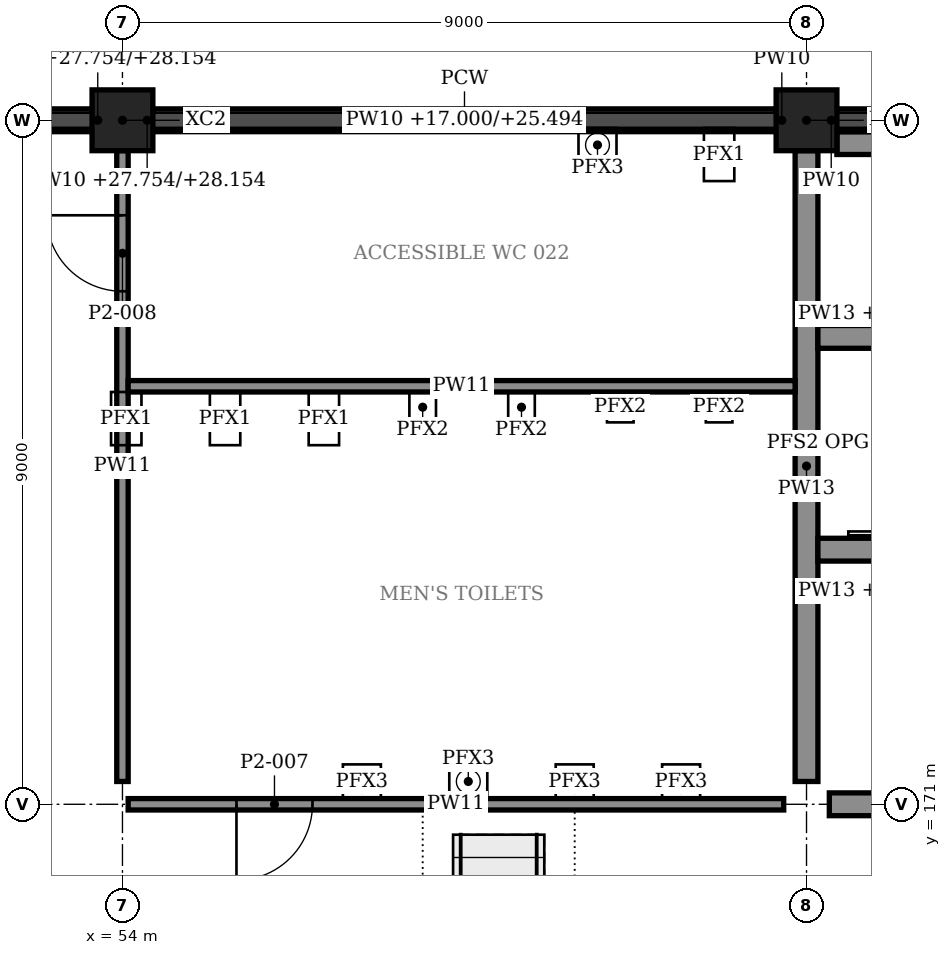
"""IFC4 building model, lengths in metres.
Left out: names, types, materials, properties, quantities, classifications, styles, units other than length and angle.
Written with IfcOpenShell. Run it as: python <this file> out.ifc"""

import sys

from ifc_helpers import new_model, si_unit, direction, frame, frame_2d, origin, origin_2d, place, context, subcontext, project, spatial, polyline, rectangle, outline, extrude, element, fill, save


model = new_model("IFC4")
c1 = context("Model", 3, precision=1e-05, world=origin(), true_north=direction((0.0, 1.0)))
c2 = subcontext(c1, "Body", "Model", "MODEL_VIEW")
j1 = project(units=[si_unit("LENGTHUNIT", "METRE"), si_unit("PLANEANGLEUNIT", "RADIAN")], contexts=[c1])
p1 = place(None, origin())
s1 = spatial("IfcSite", under=j1, at=p1, CompositionType="ELEMENT")
p2 = place(p1, origin())
s2 = spatial("IfcBuilding", under=s1, at=p2, CompositionType="ELEMENT")
p3 = place(p2, frame((0.0, 0.0, 11.5)))
s3 = spatial("IfcBuildingStorey", under=s2, at=p3, CompositionType="ELEMENT", Elevation=11.5)
for number, where, z_axis, x_axis in (
    (1, (54.0, 180.0, 0.0), (0.0, 0.0, 1.0), (1.0, 0.0, 0.0)),
    (2, (63.0, 180.0, 0.0), (0.0, 0.0, 1.0), (1.0, 0.0, 0.0)),
):
    element("IfcColumn", number, at=place(p3, frame(where, z_axis=z_axis, x_axis=x_axis)), inside=s3, PredefinedType="COLUMN", context=c2, shape_type="SweptSolid", body=[
        extrude(rectangle(XDim=0.8, YDim=0.8, at=origin_2d()), origin(), (0.0, 0.0, 1.0), 5.5),
    ])
p4 = place(p3, frame((45.4, 180.0, 5.5), z_axis=(0.0, 0.0, 1.0), x_axis=(1.0, 0.0, 0.0)))
e3 = element("IfcWall", 3, at=p4, inside=s3, PredefinedType="STANDARD", context=c2, shape_type="SweptSolid", body=[
    extrude(outline(polyline([(0.0, 0.0), (8.2, 0.0), (8.2, 10.767), (0.0, 11.846), (0.0, 0.0)])), frame((0.0, 0.15, 0.0), z_axis=(0.0, -1.0, 0.0), x_axis=(1.0, 0.0, 0.0)), (0.0, 0.0, 1.0), 0.3),
])
p5 = place(p3, frame((53.6, 180.0, 16.254), z_axis=(0.0, 0.0, 1.0), x_axis=(1.0, 0.0, 0.0)))
e4 = element("IfcWall", 4, at=p5, inside=s3, PredefinedType="STANDARD", context=c2, shape_type="SweptSolid", body=[
    extrude(rectangle(XDim=0.15, YDim=0.3, at=frame_2d((0.075, 0.0))), origin(), (0.0, 0.0, 1.0), 0.4),
])
p6 = place(p3, frame((54.4, 180.0, 5.5), z_axis=(0.0, 0.0, 1.0), x_axis=(1.0, 0.0, 0.0)))
e5 = element("IfcWall", 5, at=p6, inside=s3, PredefinedType="STANDARD", context=c2, shape_type="SweptSolid", body=[
    extrude(outline(polyline([(0.0, 0.0), (8.2, 0.0), (8.2, 8.494), (0.0, 10.653), (0.0, 0.0)])), frame((0.0, 0.15, 0.0), z_axis=(0.0, -1.0, 0.0), x_axis=(1.0, 0.0, 0.0)), (0.0, 0.0, 1.0), 0.3),
])
p7 = place(p3, frame((54.25, 180.0, 16.254), z_axis=(0.0, 0.0, 1.0), x_axis=(1.0, 0.0, 0.0)))
e6 = element("IfcWall", 6, at=p7, inside=s3, PredefinedType="STANDARD", context=c2, shape_type="SweptSolid", body=[
    extrude(rectangle(XDim=0.15, YDim=0.3, at=frame_2d((0.075, 0.0))), origin(), (0.0, 0.0, 1.0), 0.4),
])
p8 = place(p3, frame((62.6, 180.0, 13.969), z_axis=(0.0, 0.0, 1.0), x_axis=(1.0, 0.0, 0.0)))
e7 = element("IfcWall", 7, at=p8, inside=s3, PredefinedType="STANDARD", context=c2, shape_type="SweptSolid", body=[
    extrude(rectangle(XDim=0.15, YDim=0.3, at=frame_2d((0.075, 0.0))), origin(), (0.0, 0.0, 1.0), 0.4),
])
p9 = place(p3, frame((63.4, 180.0, 5.5), z_axis=(0.0, 0.0, 1.0), x_axis=(1.0, 0.0, 0.0)))
e8 = element("IfcWall", 8, at=p9, inside=s3, PredefinedType="STANDARD", context=c2, shape_type="SweptSolid", body=[
    extrude(outline(polyline([(0.0, 0.0), (8.2, 0.0), (8.2, 5.078), (0.0, 8.316), (0.0, 0.0)])), frame((0.0, 0.15, 0.0), z_axis=(0.0, -1.0, 0.0), x_axis=(1.0, 0.0, 0.0)), (0.0, 0.0, 1.0), 0.3),
])
p10 = place(p3, frame((63.25, 180.0, 13.969), z_axis=(0.0, 0.0, 1.0), x_axis=(1.0, 0.0, 0.0)))
e9 = element("IfcWall", 9, at=p10, inside=s3, PredefinedType="STANDARD", context=c2, shape_type="SweptSolid", body=[
    extrude(rectangle(XDim=0.15, YDim=0.3, at=frame_2d((0.075, 0.0))), origin(), (0.0, 0.0, 1.0), 0.4),
])
p11 = place(p3, frame((63.0, 171.3, 0.0), z_axis=(0.0, 0.0, 1.0), x_axis=(0.0, 1.0, 0.0)))
e10 = element("IfcWall", 10, at=p11, inside=s3, PredefinedType="SOLIDWALL", context=c2, shape_type="SweptSolid", body=[
    extrude(rectangle(XDim=8.3, YDim=0.3, at=frame_2d((4.15, 0.0))), origin(), (0.0, 0.0, 1.0), 2.5),
])
p12 = place(p3, frame((63.3, 171.0, 0.0), z_axis=(0.0, 0.0, 1.0), x_axis=(1.0, 0.0, 0.0)))
e11 = element("IfcWall", 11, at=p12, inside=s3, PredefinedType="SOLIDWALL", context=c2, shape_type="SweptSolid", body=[
    extrude(rectangle(XDim=8.3, YDim=0.3, at=frame_2d((4.15, 0.0))), origin(), (0.0, 0.0, 1.0), 2.5),
])
p13 = place(p12, frame((1.0, 0.0, 0.0)))
e12 = element("IfcOpeningElement", 12, at=p13, cuts=e11, PredefinedType="OPENING", context=c2, shape_type="SweptSolid", body=[
    extrude(rectangle(XDim=1.4, YDim=2.4, at=frame_2d((0.7, 1.2))), frame((0.0, 0.16, 0.0), z_axis=(0.0, -1.0, 0.0), x_axis=(1.0, 0.0, 0.0)), (0.0, 0.0, 1.0), 0.32),
])
p14 = place(p3, frame((63.4, 179.7, 0.0), z_axis=(0.0, 0.0, 1.0), x_axis=(1.0, 0.0, 0.0)))
e13 = element("IfcWall", 13, at=p14, inside=s3, PredefinedType="SOLIDWALL", context=c2, shape_type="SweptSolid", body=[
    extrude(rectangle(XDim=8.2, YDim=0.3, at=frame_2d((4.1, 0.0))), origin(), (0.0, 0.0, 1.0), 2.5),
])
p15 = place(p3, frame((54.0, 171.3, 0.0), z_axis=(0.0, 0.0, 1.0), x_axis=(0.0, 1.0, 0.0)))
e14 = element("IfcWall", 14, at=p15, inside=s3, PredefinedType="PARTITIONING", context=c2, shape_type="SweptSolid", body=[
    extrude(rectangle(XDim=8.3, YDim=0.15, at=frame_2d((4.15, 0.0))), origin(), (0.0, 0.0, 1.0), 2.5),
])
p16 = place(p15, frame((6.45, 0.0, 0.0)))
e15 = element("IfcOpeningElement", 15, at=p16, cuts=e14, PredefinedType="OPENING", context=c2, shape_type="SweptSolid", body=[
    extrude(rectangle(XDim=1.0, YDim=2.4, at=frame_2d((0.5, 1.2))), frame((0.0, 0.085, 0.0), z_axis=(0.0, -1.0, 0.0), x_axis=(1.0, 0.0, 0.0)), (0.0, 0.0, 1.0), 0.17),
])
p17 = place(p3, frame((62.7, 171.0, 0.0), z_axis=(0.0, 0.0, 1.0), x_axis=(-1.0, 0.0, 0.0)))
e16 = element("IfcWall", 16, at=p17, inside=s3, PredefinedType="PARTITIONING", context=c2, shape_type="SweptSolid", body=[
    extrude(rectangle(XDim=8.625, YDim=0.15, at=frame_2d((4.312, 0.0))), origin(), (0.0, 0.0, 1.0), 2.5),
])
p18 = place(p17, frame((6.2, 0.0, 0.0)))
e17 = element("IfcOpeningElement", 17, at=p18, cuts=e16, PredefinedType="OPENING", context=c2, shape_type="SweptSolid", body=[
    extrude(rectangle(XDim=1.0, YDim=2.4, at=frame_2d((0.5, 1.2))), frame((0.0, 0.085, 0.0), z_axis=(0.0, -1.0, 0.0), x_axis=(1.0, 0.0, 0.0)), (0.0, 0.0, 1.0), 0.17),
])
p19 = place(p3, frame((62.85, 176.5, 0.0), z_axis=(0.0, 0.0, 1.0), x_axis=(-1.0, 0.0, 0.0)))
e18 = element("IfcWall", 18, at=p19, inside=s3, PredefinedType="PARTITIONING", context=c2, shape_type="SweptSolid", body=[
    extrude(rectangle(XDim=8.775, YDim=0.15, at=frame_2d((4.388, 0.0))), origin(), (0.0, 0.0, 1.0), 2.5),
])
p20 = place(p3, frame((63.15, 174.35, 0.0), z_axis=(0.0, 0.0, 1.0), x_axis=(1.0, 0.0, 0.0)))
e19 = element("IfcWall", 19, at=p20, inside=s3, PredefinedType="SOLIDWALL", context=c2, shape_type="SweptSolid", body=[
    extrude(rectangle(XDim=2.6, YDim=0.3, at=frame_2d((1.3, 0.0))), origin(), (0.0, 0.0, 1.0), 5.1),
])
p21 = place(p20, frame((0.95, 0.0, 0.0)))
e20 = element("IfcOpeningElement", 20, at=p21, cuts=e19, PredefinedType="OPENING", context=c2, shape_type="SweptSolid", body=[
    extrude(rectangle(XDim=1.1, YDim=2.1, at=frame_2d((0.55, 1.05))), frame((0.0, 0.16, 0.0), z_axis=(0.0, -1.0, 0.0), x_axis=(1.0, 0.0, 0.0)), (0.0, 0.0, 1.0), 0.32),
])
p22 = place(p3, frame((63.15, 177.15, 0.0), z_axis=(0.0, 0.0, 1.0), x_axis=(1.0, 0.0, 0.0)))
e21 = element("IfcWall", 21, at=p22, inside=s3, PredefinedType="SOLIDWALL", context=c2, shape_type="SweptSolid", body=[
    extrude(rectangle(XDim=2.6, YDim=0.3, at=frame_2d((1.3, 0.0))), origin(), (0.0, 0.0, 1.0), 5.1),
])
p23 = place(p18, origin())
e22 = element("IfcDoor", 22, at=p23, inside=s3, OperationType="SINGLE_SWING_RIGHT", PredefinedType="DOOR", context=c2, shape_type="SweptSolid", body=[
    extrude(rectangle(XDim=1.0, YDim=2.4, at=frame_2d((0.5, 1.2))), frame((0.0, 0.025, 0.0), z_axis=(0.0, -1.0, 0.0), x_axis=(1.0, 0.0, 0.0)), (0.0, 0.0, 1.0), 0.05),
])
fill(e17, e22)
p24 = place(p16, origin())
e23 = element("IfcDoor", 23, at=p24, inside=s3, OperationType="SINGLE_SWING_RIGHT", PredefinedType="DOOR", context=c2, shape_type="SweptSolid", body=[
    extrude(rectangle(XDim=1.0, YDim=2.4, at=frame_2d((0.5, 1.2))), frame((0.0, 0.025, 0.0), z_axis=(0.0, -1.0, 0.0), x_axis=(1.0, 0.0, 0.0)), (0.0, 0.0, 1.0), 0.05),
])
fill(e15, e23)
save(model, sys.argv[1])
